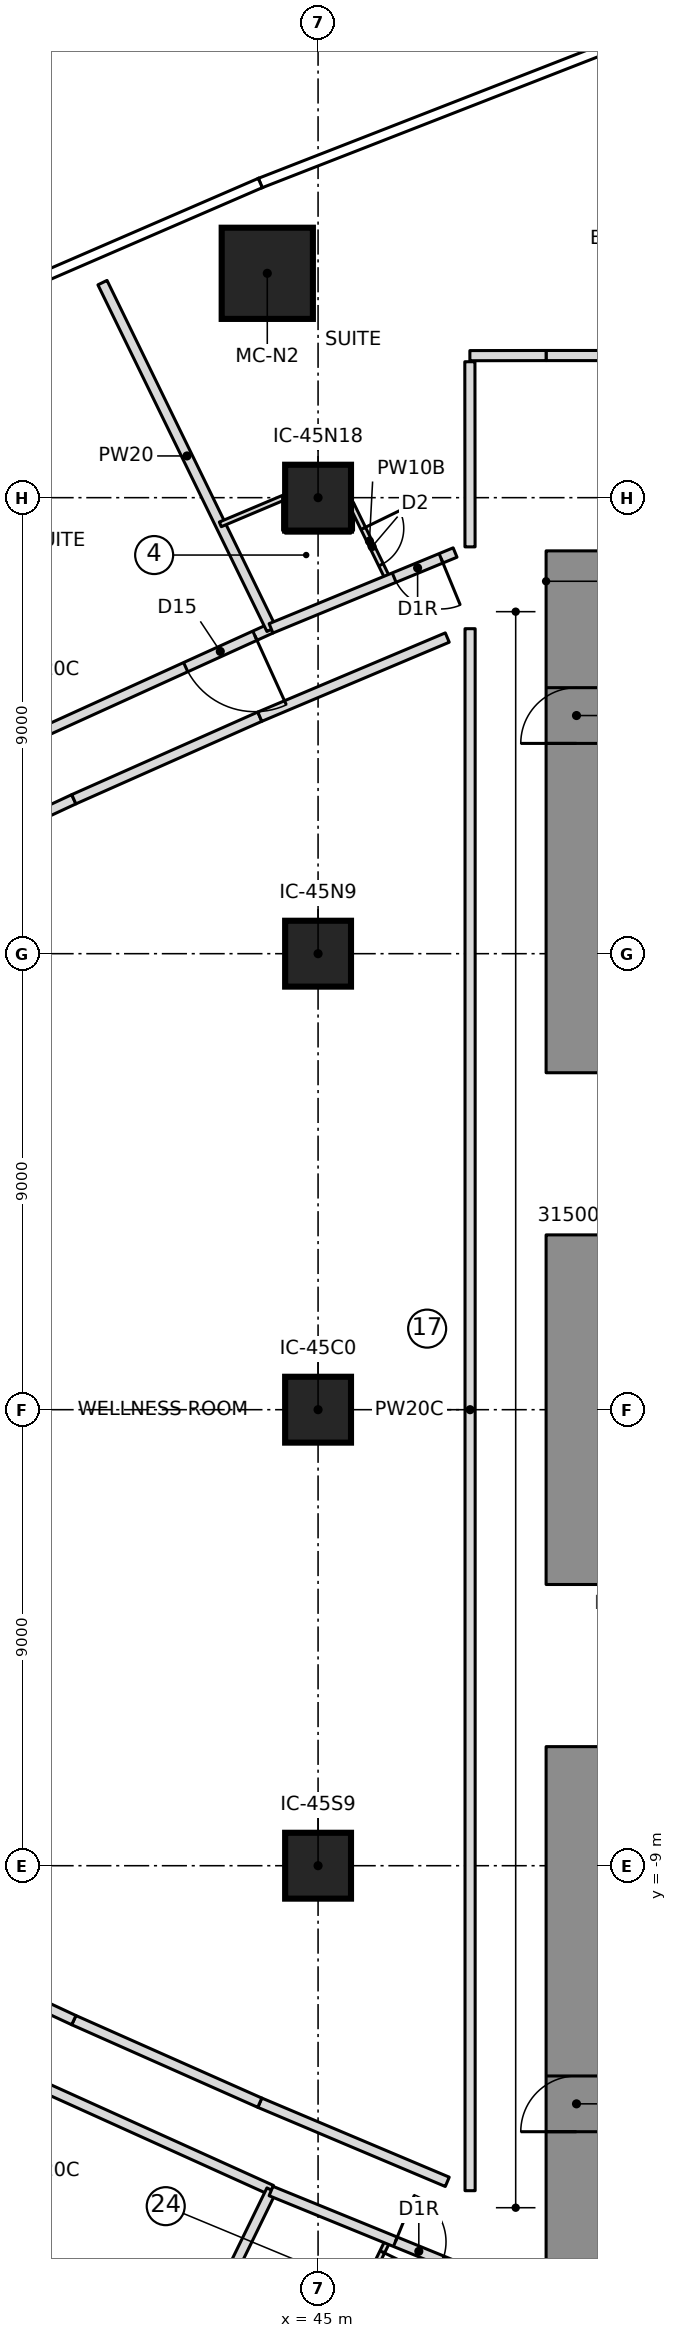
"""IFC4 building model, lengths in metres.
Left out: names, types, materials, properties, quantities, classifications, styles, units other than length and angle.
Written with IfcOpenShell. Run it as: python <this file> out.ifc"""

import sys

from ifc_helpers import new_model, si_unit, direction, frame, frame_2d, origin, origin_2d, place, context, subcontext, project, spatial, rectangle, extrude, element, fill, save


model = new_model("IFC4")
c1 = context("Model", 3, precision=1e-05, world=origin(), true_north=direction((0.0, 1.0)))
c2 = subcontext(c1, "Body", "Model", "MODEL_VIEW")
j1 = project(units=[si_unit("LENGTHUNIT", "METRE"), si_unit("PLANEANGLEUNIT", "RADIAN")], contexts=[c1])
p1 = place(None, origin())
s1 = spatial("IfcSite", under=j1, at=p1, CompositionType="ELEMENT")
p2 = place(p1, origin())
s2 = spatial("IfcBuilding", under=s1, at=p2, CompositionType="ELEMENT")
p3 = place(p2, frame((0.0, 0.0, 57.35)))
s3 = spatial("IfcBuildingStorey", under=s2, at=p3, CompositionType="ELEMENT", Elevation=57.35)
p4 = place(p3, frame((50.1, 6.65, 0.0), z_axis=(0.0, 0.0, 1.0), x_axis=(0.0, 1.0, 0.0)))
e1 = element("IfcWall", 1, at=p4, inside=s3, PredefinedType="SHEAR", context=c2, shape_type="SweptSolid", body=[
    extrude(rectangle(XDim=10.3, YDim=1.2, at=frame_2d((5.15, 0.0))), origin(), (0.0, 0.0, 1.0), 3.55),
])
p5 = place(p4, frame((6.5, 0.0, 0.0)))
e2 = element("IfcOpeningElement", 2, at=p5, cuts=e1, PredefinedType="OPENING", context=c2, shape_type="SweptSolid", body=[
    extrude(rectangle(XDim=1.1, YDim=2.1, at=frame_2d((0.55, 1.05))), frame((0.0, 0.61, 0.0), z_axis=(0.0, -1.0, 0.0), x_axis=(1.0, 0.0, 0.0)), (0.0, 0.0, 1.0), 1.22),
])
p6 = place(p3, frame((50.1, -3.45, 0.0), z_axis=(0.0, 0.0, 1.0), x_axis=(0.0, 1.0, 0.0)))
e3 = element("IfcWall", 3, at=p6, inside=s3, PredefinedType="SHEAR", context=c2, shape_type="SweptSolid", body=[
    extrude(rectangle(XDim=6.9, YDim=1.2, at=frame_2d((3.45, 0.0))), origin(), (0.0, 0.0, 1.0), 3.55),
])
p7 = place(p3, frame((50.1, -16.95, 0.0), z_axis=(0.0, 0.0, 1.0), x_axis=(0.0, 1.0, 0.0)))
e4 = element("IfcWall", 4, at=p7, inside=s3, PredefinedType="SHEAR", context=c2, shape_type="SweptSolid", body=[
    extrude(rectangle(XDim=10.3, YDim=1.2, at=frame_2d((5.15, 0.0))), origin(), (0.0, 0.0, 1.0), 3.55),
])
p8 = place(p7, frame((2.7, 0.0, 0.0)))
e5 = element("IfcOpeningElement", 5, at=p8, cuts=e4, PredefinedType="OPENING", context=c2, shape_type="SweptSolid", body=[
    extrude(rectangle(XDim=1.1, YDim=2.1, at=frame_2d((0.55, 1.05))), frame((0.0, 0.61, 0.0), z_axis=(0.0, -1.0, 0.0), x_axis=(1.0, 0.0, 0.0)), (0.0, 0.0, 1.0), 1.22),
])
p9 = place(p3, frame((43.998, 22.428, 0.0), z_axis=(0.0, 0.0, 1.0), x_axis=(1.0, 0.0, 0.0)))
e6 = element("IfcColumn", 6, at=p9, inside=s3, PredefinedType="COLUMN", context=c2, shape_type="SweptSolid", body=[
    extrude(rectangle(XDim=1.8, YDim=1.8, at=origin_2d()), origin(), (0.0, 0.0, 1.0), 3.55),
])
for number, where, z_axis, x_axis in (
    (7, (45.0, -9.0, 0.0), (0.0, 0.0, 1.0), (1.0, 0.0, 0.0)),
    (8, (45.0, 0.0, 0.0), (0.0, 0.0, 1.0), (1.0, 0.0, 0.0)),
    (9, (45.0, 9.0, 0.0), (0.0, 0.0, 1.0), (1.0, 0.0, 0.0)),
    (10, (45.0, 18.0, 0.0), (0.0, 0.0, 1.0), (1.0, 0.0, 0.0)),
):
    element("IfcColumn", number, at=place(p3, frame(where, z_axis=z_axis, x_axis=x_axis)), inside=s3, PredefinedType="COLUMN", context=c2, shape_type="SweptSolid", body=[
        extrude(rectangle(XDim=1.3, YDim=1.3, at=origin_2d()), origin(), (0.0, 0.0, 1.0), 3.55),
    ])
p10 = place(p3, frame((44.072, 15.421, 0.0), z_axis=(0.0, 0.0, 1.0), x_axis=(-0.910287143541, -0.413977434534, 0.0)))
e11 = element("IfcWall", 11, at=p10, inside=s3, PredefinedType="PARTITIONING", context=c2, shape_type="SweptSolid", body=[
    extrude(rectangle(XDim=9.803, YDim=0.2, at=frame_2d((4.902, 0.0))), origin(), (0.0, 0.0, 1.0), 3.25),
])
p11 = place(p10, frame((0.35, 0.0, 0.0)))
e12 = element("IfcOpeningElement", 12, at=p11, cuts=e11, PredefinedType="OPENING", context=c2, shape_type="SweptSolid", body=[
    extrude(rectangle(XDim=1.5, YDim=2.1, at=frame_2d((0.75, 1.05))), frame((0.0, 0.11, 0.0), z_axis=(0.0, -1.0, 0.0), x_axis=(1.0, 0.0, 0.0)), (0.0, 0.0, 1.0), 0.22),
])
p12 = place(p3, frame((44.08, 15.403, 0.0), z_axis=(0.0, 0.0, 1.0), x_axis=(-0.438196739796, 0.898879089328, 0.0)))
e13 = element("IfcWall", 13, at=p12, inside=s3, PredefinedType="PARTITIONING", context=c2, shape_type="SweptSolid", body=[
    extrude(rectangle(XDim=7.611, YDim=0.2, at=frame_2d((3.806, 0.0))), origin(), (0.0, 0.0, 1.0), 3.25),
])
p13 = place(p3, frame((43.071, 17.473, 0.0), z_axis=(0.0, 0.0, 1.0), x_axis=(0.921313965742, 0.388819465214, 0.0)))
e14 = element("IfcWall", 14, at=p13, inside=s3, PredefinedType="PARTITIONING", context=c2, shape_type="SweptSolid", body=[
    extrude(rectangle(XDim=1.388, YDim=0.1, at=frame_2d((0.694, 0.0))), origin(), (0.0, 0.0, 1.0), 3.25),
])
p14 = place(p3, frame((44.35, 18.013, 0.0), z_axis=(0.0, 0.0, 1.0), x_axis=(0.0, -1.0, 0.0)))
e15 = element("IfcWall", 15, at=p14, inside=s3, PredefinedType="PARTITIONING", context=c2, shape_type="SweptSolid", body=[
    extrude(rectangle(XDim=0.661, YDim=0.1, at=frame_2d((0.331, 0.0))), origin(), (0.0, 0.0, 1.0), 3.25),
])
p15 = place(p3, frame((44.352, 17.35, 0.0), z_axis=(0.0, 0.0, 1.0), x_axis=(1.0, 0.0, 0.0)))
e16 = element("IfcWall", 16, at=p15, inside=s3, PredefinedType="PARTITIONING", context=c2, shape_type="SweptSolid", body=[
    extrude(rectangle(XDim=1.296, YDim=0.1, at=frame_2d((0.648, 0.0))), origin(), (0.0, 0.0, 1.0), 3.25),
])
p16 = place(p3, frame((45.65, 17.352, 0.0), z_axis=(0.0, 0.0, 1.0), x_axis=(0.0, 1.0, 0.0)))
e17 = element("IfcWall", 17, at=p16, inside=s3, PredefinedType="PARTITIONING", context=c2, shape_type="SweptSolid", body=[
    extrude(rectangle(XDim=0.536, YDim=0.1, at=frame_2d((0.268, 0.0))), origin(), (0.0, 0.0, 1.0), 3.25),
])
p17 = place(p3, frame((45.65, 17.888, 0.0), z_axis=(0.0, 0.0, 1.0), x_axis=(0.438301838547, -0.89882784688, 0.0)))
e18 = element("IfcWall", 18, at=p17, inside=s3, PredefinedType="PARTITIONING", context=c2, shape_type="SweptSolid", body=[
    extrude(rectangle(XDim=1.659, YDim=0.1, at=frame_2d((0.829, 0.0))), origin(), (0.0, 0.0, 1.0), 3.25),
])
p18 = place(p17, frame((0.55, 0.0, 0.0)))
e19 = element("IfcOpeningElement", 19, at=p18, cuts=e18, PredefinedType="OPENING", context=c2, shape_type="SweptSolid", body=[
    extrude(rectangle(XDim=0.8, YDim=2.1, at=frame_2d((0.4, 1.05))), frame((0.0, 0.06, 0.0), z_axis=(0.0, -1.0, 0.0), x_axis=(1.0, 0.0, 0.0)), (0.0, 0.0, 1.0), 0.12),
])
p19 = place(p3, frame((35.148, -11.362, 0.0), z_axis=(0.0, 0.0, 1.0), x_axis=(0.9111333041, -0.412111759308, 0.0)))
e20 = element("IfcWall", 20, at=p19, inside=s3, PredefinedType="PARTITIONING", context=c2, shape_type="SweptSolid", body=[
    extrude(rectangle(XDim=9.804, YDim=0.2, at=frame_2d((4.902, 0.0))), origin(), (0.0, 0.0, 1.0), 3.25),
])
p20 = place(p19, frame((3.05, 0.0, 0.0)))
e21 = element("IfcOpeningElement", 21, at=p20, cuts=e20, PredefinedType="OPENING", context=c2, shape_type="SweptSolid", body=[
    extrude(rectangle(XDim=1.5, YDim=2.1, at=frame_2d((0.75, 1.05))), frame((0.0, 0.11, 0.0), z_axis=(0.0, -1.0, 0.0), x_axis=(1.0, 0.0, 0.0)), (0.0, 0.0, 1.0), 0.22),
])
p21 = place(p3, frame((40.745, -22.244, 0.0), z_axis=(0.0, 0.0, 1.0), x_axis=(0.438196739796, 0.898879089328, 0.0)))
e22 = element("IfcWall", 22, at=p21, inside=s3, PredefinedType="PARTITIONING", context=c2, shape_type="SweptSolid", body=[
    extrude(rectangle(XDim=7.611, YDim=0.2, at=frame_2d((3.806, 0.0))), origin(), (0.0, 0.0, 1.0), 3.25),
])
p22 = place(p3, frame((46.377, -16.397, 0.0), z_axis=(0.0, 0.0, 1.0), x_axis=(-0.438301838547, -0.89882784688, 0.0)))
e23 = element("IfcWall", 23, at=p22, inside=s3, PredefinedType="PARTITIONING", context=c2, shape_type="SweptSolid", body=[
    extrude(rectangle(XDim=1.659, YDim=0.1, at=frame_2d((0.829, 0.0))), origin(), (0.0, 0.0, 1.0), 3.25),
])
p23 = place(p22, frame((0.25, 0.0, 0.0)))
e24 = element("IfcOpeningElement", 24, at=p23, cuts=e23, PredefinedType="OPENING", context=c2, shape_type="SweptSolid", body=[
    extrude(rectangle(XDim=0.8, YDim=2.1, at=frame_2d((0.4, 1.05))), frame((0.0, 0.06, 0.0), z_axis=(0.0, -1.0, 0.0), x_axis=(1.0, 0.0, 0.0)), (0.0, 0.0, 1.0), 0.12),
])
p24 = place(p3, frame((36.54, 10.351, 0.0), z_axis=(0.0, 0.0, 1.0), x_axis=(0.906347708834, 0.42253263861, 0.0)))
e25 = element("IfcWall", 25, at=p24, inside=s3, PredefinedType="PARTITIONING", context=c2, shape_type="SweptSolid", body=[
    extrude(rectangle(XDim=4.016, YDim=0.2, at=frame_2d((2.008, 0.0))), origin(), (0.0, 0.0, 1.0), 3.25),
])
p25 = place(p24, frame((1.508, 0.0, 0.0)))
e26 = element("IfcOpeningElement", 26, at=p25, cuts=e25, PredefinedType="OPENING", context=c2, shape_type="SweptSolid", body=[
    extrude(rectangle(XDim=1.0, YDim=2.1, at=frame_2d((0.5, 1.05))), frame((0.0, 0.11, 0.0), z_axis=(0.0, -1.0, 0.0), x_axis=(1.0, 0.0, 0.0)), (0.0, 0.0, 1.0), 0.22),
])
p26 = place(p3, frame((40.18, 12.048, 0.0), z_axis=(0.0, 0.0, 1.0), x_axis=(0.913986953061, 0.405743576209, 0.0)))
e27 = element("IfcWall", 27, at=p26, inside=s3, PredefinedType="PARTITIONING", context=c2, shape_type="SweptSolid", body=[
    extrude(rectangle(XDim=4.016, YDim=0.2, at=frame_2d((2.008, 0.0))), origin(), (0.0, 0.0, 1.0), 3.25),
])
for number, where, z_axis, x_axis in (
    (28, (43.85, 13.677, 0.0), (0.0, 0.0, 1.0), (0.921, 0.389, 0.0)),
    (29, (47.55, -15.239, 0.0), (0.0, 0.0, 1.0), (-0.921, 0.389, 0.0)),
):
    element("IfcWall", number, at=place(p3, frame(where, z_axis=z_axis, x_axis=x_axis)), inside=s3, PredefinedType="PARTITIONING", context=c2, shape_type="SweptSolid", body=[
        extrude(rectangle(XDim=4.016, YDim=0.2, at=frame_2d((2.008, 0.0))), origin(), (0.0, 0.0, 1.0), 3.25),
    ])
p27 = place(p3, frame((43.85, -13.677, 0.0), z_axis=(0.0, 0.0, 1.0), x_axis=(-0.913986953061, 0.405743576209, 0.0)))
e30 = element("IfcWall", 30, at=p27, inside=s3, PredefinedType="PARTITIONING", context=c2, shape_type="SweptSolid", body=[
    extrude(rectangle(XDim=4.016, YDim=0.2, at=frame_2d((2.008, 0.0))), origin(), (0.0, 0.0, 1.0), 3.25),
])
p28 = place(p3, frame((40.18, -12.048, 0.0), z_axis=(0.0, 0.0, 1.0), x_axis=(-0.906347708834, 0.42253263861, 0.0)))
e31 = element("IfcWall", 31, at=p28, inside=s3, PredefinedType="PARTITIONING", context=c2, shape_type="SweptSolid", body=[
    extrude(rectangle(XDim=4.016, YDim=0.2, at=frame_2d((2.008, 0.0))), origin(), (0.0, 0.0, 1.0), 3.25),
])
p29 = place(p3, frame((54.597, 20.805, 0.0), z_axis=(0.0, 0.0, 1.0), x_axis=(-1.0, 0.0, 0.0)))
e32 = element("IfcWall", 32, at=p29, inside=s3, PredefinedType="PARTITIONING", context=c2, shape_type="SweptSolid", body=[
    extrude(rectangle(XDim=5.097, YDim=0.2, at=frame_2d((2.548, 0.0))), origin(), (0.0, 0.0, 1.0), 3.25),
])
p30 = place(p29, frame((2.048, 0.0, 0.0)))
e33 = element("IfcOpeningElement", 33, at=p30, cuts=e32, PredefinedType="OPENING", context=c2, shape_type="SweptSolid", body=[
    extrude(rectangle(XDim=1.5, YDim=2.1, at=frame_2d((0.75, 1.05))), frame((0.0, 0.11, 0.0), z_axis=(0.0, -1.0, 0.0), x_axis=(1.0, 0.0, 0.0)), (0.0, 0.0, 1.0), 0.22),
])
p31 = place(p3, frame((47.704, 16.917, 0.0), z_axis=(0.0, 0.0, 1.0), x_axis=(-0.924573816857, -0.381002962169, 0.0)))
e34 = element("IfcWall", 34, at=p31, inside=s3, PredefinedType="PARTITIONING", context=c2, shape_type="SweptSolid", body=[
    extrude(rectangle(XDim=3.929, YDim=0.2, at=frame_2d((1.964, 0.0))), origin(), (0.0, 0.0, 1.0), 3.25),
])
p32 = place(p31, frame((0.3, 0.0, 0.0)))
e35 = element("IfcOpeningElement", 35, at=p32, cuts=e34, PredefinedType="OPENING", context=c2, shape_type="SweptSolid", body=[
    extrude(rectangle(XDim=1.0, YDim=2.1, at=frame_2d((0.5, 1.05))), frame((0.0, 0.11, 0.0), z_axis=(0.0, -1.0, 0.0), x_axis=(1.0, 0.0, 0.0)), (0.0, 0.0, 1.0), 0.22),
])
p33 = place(p3, frame((44.072, -15.421, 0.0), z_axis=(0.0, 0.0, 1.0), x_axis=(0.925861862022, -0.377862160653, 0.0)))
e36 = element("IfcWall", 36, at=p33, inside=s3, PredefinedType="PARTITIONING", context=c2, shape_type="SweptSolid", body=[
    extrude(rectangle(XDim=3.923, YDim=0.2, at=frame_2d((1.961, 0.0))), origin(), (0.0, 0.0, 1.0), 3.25),
])
p34 = place(p33, frame((2.65, 0.0, 0.0)))
e37 = element("IfcOpeningElement", 37, at=p34, cuts=e36, PredefinedType="OPENING", context=c2, shape_type="SweptSolid", body=[
    extrude(rectangle(XDim=1.0, YDim=2.1, at=frame_2d((0.5, 1.05))), frame((0.0, 0.11, 0.0), z_axis=(0.0, -1.0, 0.0), x_axis=(1.0, 0.0, 0.0)), (0.0, 0.0, 1.0), 0.22),
])
p35 = place(p3, frame((48.0, 15.414, 0.0), z_axis=(0.0, 0.0, 1.0), x_axis=(0.0, -1.0, 0.0)))
e38 = element("IfcWall", 38, at=p35, inside=s3, PredefinedType="PARTITIONING", context=c2, shape_type="SweptSolid", body=[
    extrude(rectangle(XDim=30.828, YDim=0.2, at=frame_2d((15.414, 0.0))), origin(), (0.0, 0.0, 1.0), 3.25),
])
p36 = place(p3, frame((49.5, 20.805, 0.0), z_axis=(0.0, 0.0, 1.0), x_axis=(-0.999998933031, -0.001460800259, 0.0)))
e39 = element("IfcWall", 39, at=p36, inside=s3, PredefinedType="PARTITIONING", context=c2, shape_type="SweptSolid", body=[
    extrude(rectangle(XDim=1.504, YDim=0.2, at=frame_2d((0.752, 0.0))), origin(), (0.0, 0.0, 1.0), 3.25),
])
p37 = place(p3, frame((47.996, 20.683, 0.0), z_axis=(0.0, 0.0, 1.0), x_axis=(0.000801763623, -0.999999678587, 0.0)))
e40 = element("IfcWall", 40, at=p37, inside=s3, PredefinedType="PARTITIONING", context=c2, shape_type="SweptSolid", body=[
    extrude(rectangle(XDim=3.654, YDim=0.2, at=frame_2d((1.827, 0.0))), origin(), (0.0, 0.0, 1.0), 3.25),
])
p38 = place(p11, origin())
e41 = element("IfcDoor", 41, at=p38, inside=s3, OperationType="DOUBLE_DOOR_SINGLE_SWING", PredefinedType="DOOR", context=c2, shape_type="SweptSolid", body=[
    extrude(rectangle(XDim=1.5, YDim=2.1, at=frame_2d((0.75, 1.05))), frame((0.0, 0.025, 0.0), z_axis=(0.0, -1.0, 0.0), x_axis=(1.0, 0.0, 0.0)), (0.0, 0.0, 1.0), 0.05),
])
fill(e12, e41)
p39 = place(p18, origin())
e42 = element("IfcDoor", 42, at=p39, inside=s3, OperationType="SINGLE_SWING_LEFT", PredefinedType="DOOR", context=c2, shape_type="SweptSolid", body=[
    extrude(rectangle(XDim=0.8, YDim=2.1, at=frame_2d((0.4, 1.05))), frame((0.0, 0.025, 0.0), z_axis=(0.0, -1.0, 0.0), x_axis=(1.0, 0.0, 0.0)), (0.0, 0.0, 1.0), 0.05),
])
fill(e19, e42)
p40 = place(p32, origin())
e43 = element("IfcDoor", 43, at=p40, inside=s3, OperationType="SINGLE_SWING_RIGHT", PredefinedType="DOOR", context=c2, shape_type="SweptSolid", body=[
    extrude(rectangle(XDim=1.0, YDim=2.1, at=frame_2d((0.5, 1.05))), frame((0.0, 0.025, 0.0), z_axis=(0.0, -1.0, 0.0), x_axis=(1.0, 0.0, 0.0)), (0.0, 0.0, 1.0), 0.05),
])
fill(e35, e43)
p41 = place(p23, origin())
e44 = element("IfcDoor", 44, at=p41, inside=s3, OperationType="SINGLE_SWING_LEFT", PredefinedType="DOOR", context=c2, shape_type="SweptSolid", body=[
    extrude(rectangle(XDim=0.8, YDim=2.1, at=frame_2d((0.4, 1.05))), frame((0.0, 0.025, 0.0), z_axis=(0.0, -1.0, 0.0), x_axis=(1.0, 0.0, 0.0)), (0.0, 0.0, 1.0), 0.05),
])
fill(e24, e44)
p42 = place(p34, origin())
e45 = element("IfcDoor", 45, at=p42, inside=s3, OperationType="SINGLE_SWING_RIGHT", PredefinedType="DOOR", context=c2, shape_type="SweptSolid", body=[
    extrude(rectangle(XDim=1.0, YDim=2.1, at=frame_2d((0.5, 1.05))), frame((0.0, 0.025, 0.0), z_axis=(0.0, -1.0, 0.0), x_axis=(1.0, 0.0, 0.0)), (0.0, 0.0, 1.0), 0.05),
])
fill(e37, e45)
p43 = place(p5, origin())
e46 = element("IfcDoor", 46, at=p43, inside=s3, OperationType="SINGLE_SWING_RIGHT", PredefinedType="DOOR", context=c2, shape_type="SweptSolid", body=[
    extrude(rectangle(XDim=1.1, YDim=2.1, at=frame_2d((0.55, 1.05))), frame((0.0, 0.025, 0.0), z_axis=(0.0, -1.0, 0.0), x_axis=(1.0, 0.0, 0.0)), (0.0, 0.0, 1.0), 0.05),
])
fill(e2, e46)
p44 = place(p8, origin())
e47 = element("IfcDoor", 47, at=p44, inside=s3, OperationType="SINGLE_SWING_RIGHT", PredefinedType="DOOR", context=c2, shape_type="SweptSolid", body=[
    extrude(rectangle(XDim=1.1, YDim=2.1, at=frame_2d((0.55, 1.05))), frame((0.0, 0.025, 0.0), z_axis=(0.0, -1.0, 0.0), x_axis=(1.0, 0.0, 0.0)), (0.0, 0.0, 1.0), 0.05),
])
fill(e5, e47)
save(model, sys.argv[1])
